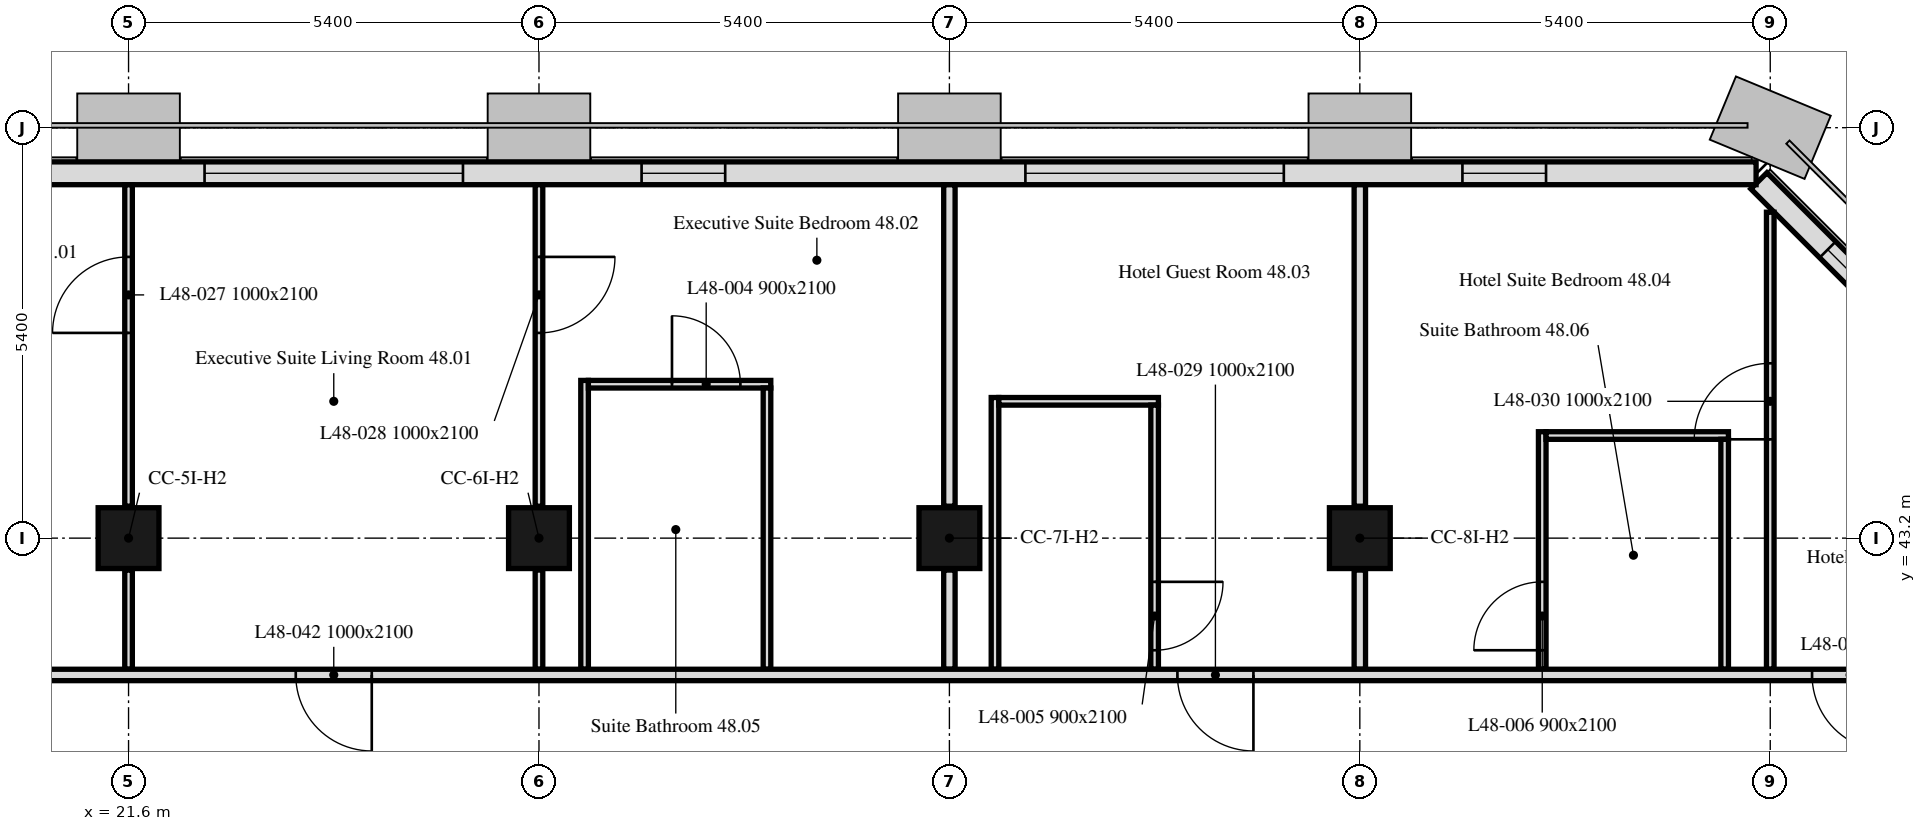
"""IFC4 building model, lengths in metres.
Left out: names, types, materials, properties, quantities, classifications, styles, units other than length and angle.
Written with IfcOpenShell. Run it as: python <this file> out.ifc"""

import sys

from ifc_helpers import new_model, si_unit, direction, frame, frame_2d, origin, origin_2d, place, context, subcontext, project, spatial, rectangle, extrude, element, fill, save


model = new_model("IFC4")
c1 = context("Model", 3, precision=1e-05, world=origin(), true_north=direction((0.0, 1.0)))
c2 = subcontext(c1, "Body", "Model", "MODEL_VIEW")
j1 = project(units=[si_unit("LENGTHUNIT", "METRE"), si_unit("PLANEANGLEUNIT", "RADIAN")], contexts=[c1])
p1 = place(None, origin())
s1 = spatial("IfcSite", under=j1, at=p1, CompositionType="ELEMENT")
p2 = place(p1, origin())
s2 = spatial("IfcBuilding", under=s1, at=p2, CompositionType="ELEMENT")
p3 = place(p2, frame((0.0, 0.0, 197.2)))
s3 = spatial("IfcBuildingStorey", under=s2, at=p3, CompositionType="ELEMENT", Elevation=197.2)
for number, where, z_axis, x_axis in (
    (1, (21.6, 43.2, 0.0), (0.0, 0.0, 1.0), (1.0, 0.0, 0.0)),
    (2, (27.0, 43.2, 0.0), (0.0, 0.0, 1.0), (1.0, 0.0, 0.0)),
    (3, (32.4, 43.2, 0.0), (0.0, 0.0, 1.0), (1.0, 0.0, 0.0)),
    (4, (37.8, 43.2, 0.0), (0.0, 0.0, 1.0), (1.0, 0.0, 0.0)),
):
    element("IfcColumn", number, at=place(p3, frame(where, z_axis=z_axis, x_axis=x_axis)), inside=s3, PredefinedType="COLUMN", context=c2, shape_type="SweptSolid", body=[
        extrude(rectangle(XDim=0.8, YDim=0.8, at=origin_2d()), origin(), (0.0, 0.0, 1.0), 3.0),
    ])
p4 = place(p3, frame((47.901, 43.051, 0.0), z_axis=(0.0, 0.0, 1.0), x_axis=(-0.707106781187, 0.707106781187, 0.0)))
e5 = element("IfcWall", 5, at=p4, inside=s3, PredefinedType="SOLIDWALL", context=c2, shape_type="SweptSolid", body=[
    extrude(rectangle(XDim=6.86, YDim=0.3, at=frame_2d((3.43, 0.0))), origin(), (0.0, 0.0, 1.0), 3.0),
])
p5 = place(p4, frame((1.28, 0.0, 0.9)))
e6 = element("IfcOpeningElement", 6, at=p5, cuts=e5, PredefinedType="OPENING", context=c2, shape_type="SweptSolid", body=[
    extrude(rectangle(XDim=1.1, YDim=1.7, at=frame_2d((0.55, 0.85))), frame((0.0, 0.16, 0.0), z_axis=(0.0, -1.0, 0.0), x_axis=(1.0, 0.0, 0.0)), (0.0, 0.0, 1.0), 0.32),
])
p6 = place(p4, frame((4.48, 0.0, 0.9)))
e7 = element("IfcOpeningElement", 7, at=p6, cuts=e5, PredefinedType="OPENING", context=c2, shape_type="SweptSolid", body=[
    extrude(rectangle(XDim=1.1, YDim=1.7, at=frame_2d((0.55, 0.85))), frame((0.0, 0.16, 0.0), z_axis=(0.0, -1.0, 0.0), x_axis=(1.0, 0.0, 0.0)), (0.0, 0.0, 1.0), 0.32),
])
p7 = place(p3, frame((43.014, 48.0, 0.0), z_axis=(0.0, 0.0, 1.0), x_axis=(-1.0, 0.0, 0.0)))
e8 = element("IfcWall", 8, at=p7, inside=s3, PredefinedType="SOLIDWALL", context=c2, shape_type="SweptSolid", body=[
    extrude(rectangle(XDim=32.027, YDim=0.3, at=frame_2d((16.014, 0.0))), origin(), (0.0, 0.0, 1.0), 3.0),
])
p8 = place(p7, frame((2.764, 0.0, 0.9)))
e9 = element("IfcOpeningElement", 9, at=p8, cuts=e8, PredefinedType="OPENING", context=c2, shape_type="SweptSolid", body=[
    extrude(rectangle(XDim=1.1, YDim=1.7, at=frame_2d((0.55, 0.85))), frame((0.0, 0.16, 0.0), z_axis=(0.0, -1.0, 0.0), x_axis=(1.0, 0.0, 0.0)), (0.0, 0.0, 1.0), 0.32),
])
p9 = place(p7, frame((6.214, 0.0, 0.9)))
e10 = element("IfcOpeningElement", 10, at=p9, cuts=e8, PredefinedType="OPENING", context=c2, shape_type="SweptSolid", body=[
    extrude(rectangle(XDim=3.4, YDim=1.7, at=frame_2d((1.7, 0.85))), frame((0.0, 0.16, 0.0), z_axis=(0.0, -1.0, 0.0), x_axis=(1.0, 0.0, 0.0)), (0.0, 0.0, 1.0), 0.32),
])
p10 = place(p7, frame((13.564, 0.0, 0.9)))
e11 = element("IfcOpeningElement", 11, at=p10, cuts=e8, PredefinedType="OPENING", context=c2, shape_type="SweptSolid", body=[
    extrude(rectangle(XDim=1.1, YDim=1.7, at=frame_2d((0.55, 0.85))), frame((0.0, 0.16, 0.0), z_axis=(0.0, -1.0, 0.0), x_axis=(1.0, 0.0, 0.0)), (0.0, 0.0, 1.0), 0.32),
])
p11 = place(p7, frame((17.014, 0.0, 0.9)))
e12 = element("IfcOpeningElement", 12, at=p11, cuts=e8, PredefinedType="OPENING", context=c2, shape_type="SweptSolid", body=[
    extrude(rectangle(XDim=3.4, YDim=1.7, at=frame_2d((1.7, 0.85))), frame((0.0, 0.16, 0.0), z_axis=(0.0, -1.0, 0.0), x_axis=(1.0, 0.0, 0.0)), (0.0, 0.0, 1.0), 0.32),
])
p12 = place(p7, frame((24.364, 0.0, 0.9)))
e13 = element("IfcOpeningElement", 13, at=p12, cuts=e8, PredefinedType="OPENING", context=c2, shape_type="SweptSolid", body=[
    extrude(rectangle(XDim=1.1, YDim=1.7, at=frame_2d((0.55, 0.85))), frame((0.0, 0.16, 0.0), z_axis=(0.0, -1.0, 0.0), x_axis=(1.0, 0.0, 0.0)), (0.0, 0.0, 1.0), 0.32),
])
p13 = place(p7, frame((27.814, 0.0, 0.9)))
e14 = element("IfcOpeningElement", 14, at=p13, cuts=e8, PredefinedType="OPENING", context=c2, shape_type="SweptSolid", body=[
    extrude(rectangle(XDim=3.4, YDim=1.7, at=frame_2d((1.7, 0.85))), frame((0.0, 0.16, 0.0), z_axis=(0.0, -1.0, 0.0), x_axis=(1.0, 0.0, 0.0)), (0.0, 0.0, 1.0), 0.32),
])
p14 = place(p3, frame((21.6, 41.475, 0.0), z_axis=(0.0, 0.0, 1.0), x_axis=(0.0, 1.0, 0.0)))
e15 = element("IfcWall", 15, at=p14, inside=s3, PredefinedType="PARTITIONING", context=c2, shape_type="SweptSolid", body=[
    extrude(rectangle(XDim=1.305, YDim=0.1, at=frame_2d((0.652, 0.0))), origin(), (0.0, 0.0, 1.0), 2.4),
])
p15 = place(p3, frame((21.6, 43.62, 0.0), z_axis=(0.0, 0.0, 1.0), x_axis=(0.0, 1.0, 0.0)))
e16 = element("IfcWall", 16, at=p15, inside=s3, PredefinedType="PARTITIONING", context=c2, shape_type="SweptSolid", body=[
    extrude(rectangle(XDim=4.229, YDim=0.1, at=frame_2d((2.115, 0.0))), origin(), (0.0, 0.0, 1.0), 2.4),
])
p16 = place(p15, frame((2.28, 0.0, 0.0)))
e17 = element("IfcOpeningElement", 17, at=p16, cuts=e16, PredefinedType="OPENING", context=c2, shape_type="SweptSolid", body=[
    extrude(rectangle(XDim=1.0, YDim=2.1, at=frame_2d((0.5, 1.05))), frame((0.0, 0.05, 0.0), z_axis=(0.0, -1.0, 0.0), x_axis=(1.0, 0.0, 0.0)), (0.0, 0.0, 1.0), 0.1),
])
p17 = place(p3, frame((27.0, 47.849, 0.0), z_axis=(0.0, 0.0, 1.0), x_axis=(0.0, -1.0, 0.0)))
e18 = element("IfcWall", 18, at=p17, inside=s3, PredefinedType="PARTITIONING", context=c2, shape_type="SweptSolid", body=[
    extrude(rectangle(XDim=4.229, YDim=0.1, at=frame_2d((2.115, 0.0))), origin(), (0.0, 0.0, 1.0), 2.4),
])
p18 = place(p17, frame((0.949, 0.0, 0.0)))
e19 = element("IfcOpeningElement", 19, at=p18, cuts=e18, PredefinedType="OPENING", context=c2, shape_type="SweptSolid", body=[
    extrude(rectangle(XDim=1.0, YDim=2.1, at=frame_2d((0.5, 1.05))), frame((0.0, 0.05, 0.0), z_axis=(0.0, -1.0, 0.0), x_axis=(1.0, 0.0, 0.0)), (0.0, 0.0, 1.0), 0.1),
])
p19 = place(p3, frame((27.0, 42.78, 0.0), z_axis=(0.0, 0.0, 1.0), x_axis=(0.0, -1.0, 0.0)))
e20 = element("IfcWall", 20, at=p19, inside=s3, PredefinedType="PARTITIONING", context=c2, shape_type="SweptSolid", body=[
    extrude(rectangle(XDim=1.305, YDim=0.1, at=frame_2d((0.652, 0.0))), origin(), (0.0, 0.0, 1.0), 2.4),
])
p20 = place(p3, frame((27.6, 41.475, 0.0), z_axis=(0.0, 0.0, 1.0), x_axis=(0.0, 1.0, 0.0)))
e21 = element("IfcWall", 21, at=p20, inside=s3, PredefinedType="PARTITIONING", context=c2, shape_type="SweptSolid", body=[
    extrude(rectangle(XDim=3.8, YDim=0.1, at=frame_2d((1.9, 0.0))), origin(), (0.0, 0.0, 1.0), 3.0),
])
p21 = place(p3, frame((27.65, 45.225, 0.0), z_axis=(0.0, 0.0, 1.0), x_axis=(1.0, 0.0, 0.0)))
e22 = element("IfcWall", 22, at=p21, inside=s3, PredefinedType="PARTITIONING", context=c2, shape_type="SweptSolid", body=[
    extrude(rectangle(XDim=2.4, YDim=0.1, at=frame_2d((1.2, 0.0))), origin(), (0.0, 0.0, 1.0), 3.0),
])
p22 = place(p21, frame((1.1, 0.0, 0.0)))
e23 = element("IfcOpeningElement", 23, at=p22, cuts=e22, PredefinedType="OPENING", context=c2, shape_type="SweptSolid", body=[
    extrude(rectangle(XDim=0.9, YDim=2.1, at=frame_2d((0.45, 1.05))), frame((0.0, 0.05, 0.0), z_axis=(0.0, -1.0, 0.0), x_axis=(1.0, 0.0, 0.0)), (0.0, 0.0, 1.0), 0.1),
])
p23 = place(p3, frame((30.0, 45.175, 0.0), z_axis=(0.0, 0.0, 1.0), x_axis=(0.0, -1.0, 0.0)))
e24 = element("IfcWall", 24, at=p23, inside=s3, PredefinedType="PARTITIONING", context=c2, shape_type="SweptSolid", body=[
    extrude(rectangle(XDim=3.7, YDim=0.1, at=frame_2d((1.85, 0.0))), origin(), (0.0, 0.0, 1.0), 3.0),
])
p24 = place(p3, frame((32.4, 41.475, 0.0), z_axis=(0.0, 0.0, 1.0), x_axis=(0.0, 1.0, 0.0)))
e25 = element("IfcWall", 25, at=p24, inside=s3, PredefinedType="PARTITIONING", context=c2, shape_type="SweptSolid", body=[
    extrude(rectangle(XDim=1.305, YDim=0.15, at=frame_2d((0.652, 0.0))), origin(), (0.0, 0.0, 1.0), 2.4),
])
p25 = place(p3, frame((32.4, 43.62, 0.0), z_axis=(0.0, 0.0, 1.0), x_axis=(0.0, 1.0, 0.0)))
e26 = element("IfcWall", 26, at=p25, inside=s3, PredefinedType="PARTITIONING", context=c2, shape_type="SweptSolid", body=[
    extrude(rectangle(XDim=4.229, YDim=0.15, at=frame_2d((2.115, 0.0))), origin(), (0.0, 0.0, 1.0), 2.4),
])
p26 = place(p3, frame((33.0, 41.475, 0.0), z_axis=(0.0, 0.0, 1.0), x_axis=(0.0, 1.0, 0.0)))
e27 = element("IfcWall", 27, at=p26, inside=s3, PredefinedType="PARTITIONING", context=c2, shape_type="SweptSolid", body=[
    extrude(rectangle(XDim=3.575, YDim=0.1, at=frame_2d((1.788, 0.0))), origin(), (0.0, 0.0, 1.0), 3.0),
])
p27 = place(p3, frame((33.05, 45.0, 0.0), z_axis=(0.0, 0.0, 1.0), x_axis=(1.0, 0.0, 0.0)))
e28 = element("IfcWall", 28, at=p27, inside=s3, PredefinedType="PARTITIONING", context=c2, shape_type="SweptSolid", body=[
    extrude(rectangle(XDim=2.1, YDim=0.1, at=frame_2d((1.05, 0.0))), origin(), (0.0, 0.0, 1.0), 3.0),
])
p28 = place(p3, frame((35.1, 44.95, 0.0), z_axis=(0.0, 0.0, 1.0), x_axis=(0.0, -1.0, 0.0)))
e29 = element("IfcWall", 29, at=p28, inside=s3, PredefinedType="PARTITIONING", context=c2, shape_type="SweptSolid", body=[
    extrude(rectangle(XDim=3.475, YDim=0.1, at=frame_2d((1.737, 0.0))), origin(), (0.0, 0.0, 1.0), 3.0),
])
p29 = place(p28, frame((2.325, 0.0, 0.0)))
e30 = element("IfcOpeningElement", 30, at=p29, cuts=e29, PredefinedType="OPENING", context=c2, shape_type="SweptSolid", body=[
    extrude(rectangle(XDim=0.9, YDim=2.1, at=frame_2d((0.45, 1.05))), frame((0.0, 0.05, 0.0), z_axis=(0.0, -1.0, 0.0), x_axis=(1.0, 0.0, 0.0)), (0.0, 0.0, 1.0), 0.1),
])
p30 = place(p3, frame((37.8, 41.475, 0.0), z_axis=(0.0, 0.0, 1.0), x_axis=(0.0, 1.0, 0.0)))
e31 = element("IfcWall", 31, at=p30, inside=s3, PredefinedType="PARTITIONING", context=c2, shape_type="SweptSolid", body=[
    extrude(rectangle(XDim=1.305, YDim=0.15, at=frame_2d((0.652, 0.0))), origin(), (0.0, 0.0, 1.0), 2.4),
])
p31 = place(p3, frame((37.8, 43.62, 0.0), z_axis=(0.0, 0.0, 1.0), x_axis=(0.0, 1.0, 0.0)))
e32 = element("IfcWall", 32, at=p31, inside=s3, PredefinedType="PARTITIONING", context=c2, shape_type="SweptSolid", body=[
    extrude(rectangle(XDim=4.229, YDim=0.15, at=frame_2d((2.115, 0.0))), origin(), (0.0, 0.0, 1.0), 2.4),
])
p32 = place(p3, frame((40.2, 41.475, 0.0), z_axis=(0.0, 0.0, 1.0), x_axis=(0.0, 1.0, 0.0)))
e33 = element("IfcWall", 33, at=p32, inside=s3, PredefinedType="PARTITIONING", context=c2, shape_type="SweptSolid", body=[
    extrude(rectangle(XDim=3.125, YDim=0.1, at=frame_2d((1.562, 0.0))), origin(), (0.0, 0.0, 1.0), 3.0),
])
p33 = place(p32, frame((0.25, 0.0, 0.0)))
e34 = element("IfcOpeningElement", 34, at=p33, cuts=e33, PredefinedType="OPENING", context=c2, shape_type="SweptSolid", body=[
    extrude(rectangle(XDim=0.9, YDim=2.1, at=frame_2d((0.45, 1.05))), frame((0.0, 0.05, 0.0), z_axis=(0.0, -1.0, 0.0), x_axis=(1.0, 0.0, 0.0)), (0.0, 0.0, 1.0), 0.1),
])
p34 = place(p3, frame((40.25, 44.55, 0.0), z_axis=(0.0, 0.0, 1.0), x_axis=(1.0, 0.0, 0.0)))
e35 = element("IfcWall", 35, at=p34, inside=s3, PredefinedType="PARTITIONING", context=c2, shape_type="SweptSolid", body=[
    extrude(rectangle(XDim=2.4, YDim=0.1, at=frame_2d((1.2, 0.0))), origin(), (0.0, 0.0, 1.0), 3.0),
])
p35 = place(p3, frame((42.6, 44.5, 0.0), z_axis=(0.0, 0.0, 1.0), x_axis=(0.0, -1.0, 0.0)))
e36 = element("IfcWall", 36, at=p35, inside=s3, PredefinedType="PARTITIONING", context=c2, shape_type="SweptSolid", body=[
    extrude(rectangle(XDim=3.025, YDim=0.1, at=frame_2d((1.512, 0.0))), origin(), (0.0, 0.0, 1.0), 3.0),
])
p36 = place(p3, frame((43.2, 41.475, 0.0), z_axis=(0.0, 0.0, 1.0), x_axis=(0.0, 1.0, 0.0)))
e37 = element("IfcWall", 37, at=p36, inside=s3, PredefinedType="PARTITIONING", context=c2, shape_type="SweptSolid", body=[
    extrude(rectangle(XDim=6.013, YDim=0.1, at=frame_2d((3.006, 0.0))), origin(), (0.0, 0.0, 1.0), 3.0),
])
p37 = place(p36, frame((3.025, 0.0, 0.0)))
e38 = element("IfcOpeningElement", 38, at=p37, cuts=e37, PredefinedType="OPENING", context=c2, shape_type="SweptSolid", body=[
    extrude(rectangle(XDim=1.0, YDim=2.1, at=frame_2d((0.5, 1.05))), frame((0.0, 0.05, 0.0), z_axis=(0.0, -1.0, 0.0), x_axis=(1.0, 0.0, 0.0)), (0.0, 0.0, 1.0), 0.1),
])
p38 = place(p3, frame((47.849, 41.4, 0.0), z_axis=(0.0, 0.0, 1.0), x_axis=(-1.0, 0.0, 0.0)))
e39 = element("IfcWall", 39, at=p38, inside=s3, PredefinedType="PARTITIONING", context=c2, shape_type="SweptSolid", body=[
    extrude(rectangle(XDim=41.698, YDim=0.15, at=frame_2d((20.849, 0.0))), origin(), (0.0, 0.0, 1.0), 2.4),
])
p39 = place(p38, frame((39.249, 0.0, 0.0)))
e40 = element("IfcOpeningElement", 40, at=p39, cuts=e39, PredefinedType="OPENING", context=c2, shape_type="SweptSolid", body=[
    extrude(rectangle(XDim=1.0, YDim=2.1, at=frame_2d((0.5, 1.05))), frame((0.0, 0.075, 0.0), z_axis=(0.0, -1.0, 0.0), x_axis=(1.0, 0.0, 0.0)), (0.0, 0.0, 1.0), 0.15),
])
p40 = place(p38, frame((11.449, 0.0, 0.0)))
e41 = element("IfcOpeningElement", 41, at=p40, cuts=e39, PredefinedType="OPENING", context=c2, shape_type="SweptSolid", body=[
    extrude(rectangle(XDim=1.0, YDim=2.1, at=frame_2d((0.5, 1.05))), frame((0.0, 0.075, 0.0), z_axis=(0.0, -1.0, 0.0), x_axis=(1.0, 0.0, 0.0)), (0.0, 0.0, 1.0), 0.15),
])
p41 = place(p38, frame((3.099, 0.0, 0.0)))
e42 = element("IfcOpeningElement", 42, at=p41, cuts=e39, PredefinedType="OPENING", context=c2, shape_type="SweptSolid", body=[
    extrude(rectangle(XDim=1.0, YDim=2.1, at=frame_2d((0.5, 1.05))), frame((0.0, 0.075, 0.0), z_axis=(0.0, -1.0, 0.0), x_axis=(1.0, 0.0, 0.0)), (0.0, 0.0, 1.0), 0.15),
])
p42 = place(p38, frame((23.049, 0.0, 0.0)))
e43 = element("IfcOpeningElement", 43, at=p42, cuts=e39, PredefinedType="OPENING", context=c2, shape_type="SweptSolid", body=[
    extrude(rectangle(XDim=1.0, YDim=2.1, at=frame_2d((0.5, 1.05))), frame((0.0, 0.075, 0.0), z_axis=(0.0, -1.0, 0.0), x_axis=(1.0, 0.0, 0.0)), (0.0, 0.0, 1.0), 0.15),
])
p43 = place(p6, origin())
e44 = element("IfcWindow", 44, at=p43, inside=s3, PartitioningType="SINGLE_PANEL", PredefinedType="WINDOW", context=c2, shape_type="SweptSolid", body=[
    extrude(rectangle(XDim=1.1, YDim=1.7, at=frame_2d((0.55, 0.85))), frame((0.0, 0.03, 0.0), z_axis=(0.0, -1.0, 0.0), x_axis=(1.0, 0.0, 0.0)), (0.0, 0.0, 1.0), 0.06),
])
fill(e7, e44)
p44 = place(p8, origin())
e45 = element("IfcWindow", 45, at=p44, inside=s3, PartitioningType="SINGLE_PANEL", PredefinedType="WINDOW", context=c2, shape_type="SweptSolid", body=[
    extrude(rectangle(XDim=1.1, YDim=1.7, at=frame_2d((0.55, 0.85))), frame((0.0, 0.03, 0.0), z_axis=(0.0, -1.0, 0.0), x_axis=(1.0, 0.0, 0.0)), (0.0, 0.0, 1.0), 0.06),
])
fill(e9, e45)
p45 = place(p9, origin())
e46 = element("IfcWindow", 46, at=p45, inside=s3, PartitioningType="SINGLE_PANEL", PredefinedType="WINDOW", context=c2, shape_type="SweptSolid", body=[
    extrude(rectangle(XDim=3.4, YDim=1.7, at=frame_2d((1.7, 0.85))), frame((0.0, 0.03, 0.0), z_axis=(0.0, -1.0, 0.0), x_axis=(1.0, 0.0, 0.0)), (0.0, 0.0, 1.0), 0.06),
])
fill(e10, e46)
p46 = place(p10, origin())
e47 = element("IfcWindow", 47, at=p46, inside=s3, PartitioningType="SINGLE_PANEL", PredefinedType="WINDOW", context=c2, shape_type="SweptSolid", body=[
    extrude(rectangle(XDim=1.1, YDim=1.7, at=frame_2d((0.55, 0.85))), frame((0.0, 0.03, 0.0), z_axis=(0.0, -1.0, 0.0), x_axis=(1.0, 0.0, 0.0)), (0.0, 0.0, 1.0), 0.06),
])
fill(e11, e47)
p47 = place(p11, origin())
e48 = element("IfcWindow", 48, at=p47, inside=s3, PartitioningType="SINGLE_PANEL", PredefinedType="WINDOW", context=c2, shape_type="SweptSolid", body=[
    extrude(rectangle(XDim=3.4, YDim=1.7, at=frame_2d((1.7, 0.85))), frame((0.0, 0.03, 0.0), z_axis=(0.0, -1.0, 0.0), x_axis=(1.0, 0.0, 0.0)), (0.0, 0.0, 1.0), 0.06),
])
fill(e12, e48)
p48 = place(p22, origin())
e49 = element("IfcDoor", 49, at=p48, inside=s3, OperationType="SINGLE_SWING_LEFT", PredefinedType="DOOR", context=c2, shape_type="SweptSolid", body=[
    extrude(rectangle(XDim=0.9, YDim=2.1, at=frame_2d((0.45, 1.05))), frame((0.0, 0.025, 0.0), z_axis=(0.0, -1.0, 0.0), x_axis=(1.0, 0.0, 0.0)), (0.0, 0.0, 1.0), 0.05),
])
fill(e23, e49)
p49 = place(p29, origin())
e50 = element("IfcDoor", 50, at=p49, inside=s3, OperationType="SINGLE_SWING_LEFT", PredefinedType="DOOR", context=c2, shape_type="SweptSolid", body=[
    extrude(rectangle(XDim=0.9, YDim=2.1, at=frame_2d((0.45, 1.05))), frame((0.0, 0.025, 0.0), z_axis=(0.0, -1.0, 0.0), x_axis=(1.0, 0.0, 0.0)), (0.0, 0.0, 1.0), 0.05),
])
fill(e30, e50)
p50 = place(p33, origin())
e51 = element("IfcDoor", 51, at=p50, inside=s3, OperationType="SINGLE_SWING_LEFT", PredefinedType="DOOR", context=c2, shape_type="SweptSolid", body=[
    extrude(rectangle(XDim=0.9, YDim=2.1, at=frame_2d((0.45, 1.05))), frame((0.0, 0.025, 0.0), z_axis=(0.0, -1.0, 0.0), x_axis=(1.0, 0.0, 0.0)), (0.0, 0.0, 1.0), 0.05),
])
fill(e34, e51)
p51 = place(p16, origin())
e52 = element("IfcDoor", 52, at=p51, inside=s3, OperationType="SINGLE_SWING_RIGHT", PredefinedType="DOOR", context=c2, shape_type="SweptSolid", body=[
    extrude(rectangle(XDim=1.0, YDim=2.1, at=frame_2d((0.5, 1.05))), frame((0.0, 0.025, 0.0), z_axis=(0.0, -1.0, 0.0), x_axis=(1.0, 0.0, 0.0)), (0.0, 0.0, 1.0), 0.05),
])
fill(e17, e52)
p52 = place(p18, origin())
e53 = element("IfcDoor", 53, at=p52, inside=s3, OperationType="SINGLE_SWING_RIGHT", PredefinedType="DOOR", context=c2, shape_type="SweptSolid", body=[
    extrude(rectangle(XDim=1.0, YDim=2.1, at=frame_2d((0.5, 1.05))), frame((0.0, 0.025, 0.0), z_axis=(0.0, -1.0, 0.0), x_axis=(1.0, 0.0, 0.0)), (0.0, 0.0, 1.0), 0.05),
])
fill(e19, e53)
p53 = place(p40, origin())
e54 = element("IfcDoor", 54, at=p53, inside=s3, OperationType="SINGLE_SWING_LEFT", PredefinedType="DOOR", context=c2, shape_type="SweptSolid", body=[
    extrude(rectangle(XDim=1.0, YDim=2.1, at=frame_2d((0.5, 1.05))), frame((0.0, 0.025, 0.0), z_axis=(0.0, -1.0, 0.0), x_axis=(1.0, 0.0, 0.0)), (0.0, 0.0, 1.0), 0.05),
])
fill(e41, e54)
p54 = place(p37, origin())
e55 = element("IfcDoor", 55, at=p54, inside=s3, OperationType="SINGLE_SWING_LEFT", PredefinedType="DOOR", context=c2, shape_type="SweptSolid", body=[
    extrude(rectangle(XDim=1.0, YDim=2.1, at=frame_2d((0.5, 1.05))), frame((0.0, 0.025, 0.0), z_axis=(0.0, -1.0, 0.0), x_axis=(1.0, 0.0, 0.0)), (0.0, 0.0, 1.0), 0.05),
])
fill(e38, e55)
p55 = place(p41, origin())
e56 = element("IfcDoor", 56, at=p55, inside=s3, OperationType="SINGLE_SWING_LEFT", PredefinedType="DOOR", context=c2, shape_type="SweptSolid", body=[
    extrude(rectangle(XDim=1.0, YDim=2.1, at=frame_2d((0.5, 1.05))), frame((0.0, 0.025, 0.0), z_axis=(0.0, -1.0, 0.0), x_axis=(1.0, 0.0, 0.0)), (0.0, 0.0, 1.0), 0.05),
])
fill(e42, e56)
p56 = place(p42, origin())
e57 = element("IfcDoor", 57, at=p56, inside=s3, OperationType="SINGLE_SWING_RIGHT", PredefinedType="DOOR", context=c2, shape_type="SweptSolid", body=[
    extrude(rectangle(XDim=1.0, YDim=2.1, at=frame_2d((0.5, 1.05))), frame((0.0, 0.025, 0.0), z_axis=(0.0, -1.0, 0.0), x_axis=(1.0, 0.0, 0.0)), (0.0, 0.0, 1.0), 0.05),
])
fill(e43, e57)
save(model, sys.argv[1])
